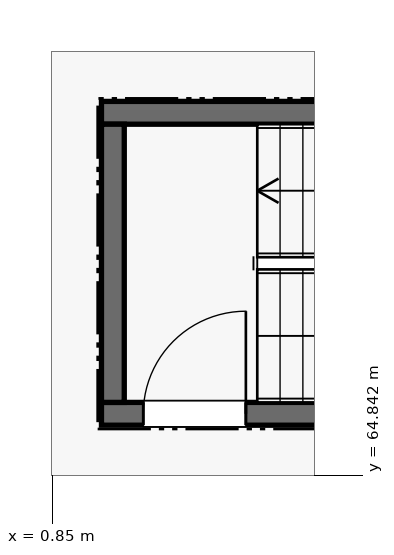
"""IFC4 building model, lengths in metres.
Left out: names, types, materials, properties, quantities, classifications, styles, units other than length and angle.
Written with IfcOpenShell. Run it as: python <this file> out.ifc"""

import sys

from ifc_helpers import new_model, si_unit, direction, frame, frame_2d, origin, place, context, subcontext, project, spatial, rectangle, extrude, element, fill, save


model = new_model("IFC4")
c1 = context("Model", 3, precision=1e-05, world=origin(), true_north=direction((0.0, 1.0)))
c2 = subcontext(c1, "Body", "Model", "MODEL_VIEW")
j1 = project(units=[si_unit("LENGTHUNIT", "METRE"), si_unit("PLANEANGLEUNIT", "RADIAN")], contexts=[c1])
p1 = place(None, origin())
s1 = spatial("IfcSite", under=j1, at=p1, CompositionType="ELEMENT")
p2 = place(p1, origin())
s2 = spatial("IfcBuilding", under=s1, at=p2, CompositionType="ELEMENT")
p3 = place(p2, frame((0.0, 0.0, 9.9)))
s3 = spatial("IfcBuildingStorey", under=s2, at=p3, CompositionType="ELEMENT", Elevation=9.9)
p4 = place(p3, frame((1.5, 65.65, 0.0), z_axis=(0.0, 0.0, 1.0), x_axis=(1.0, 0.0, 0.0)))
e1 = element("IfcWall", 1, at=p4, inside=s3, PredefinedType="SHEAR", context=c2, shape_type="SweptSolid", body=[
    extrude(rectangle(XDim=8.65, YDim=0.3, at=frame_2d((4.325, 0.0))), origin(), (0.0, 0.0, 1.0), 3.98),
])
p5 = place(p4, frame((0.55, 0.0, 0.0)))
e2 = element("IfcOpeningElement", 2, at=p5, cuts=e1, PredefinedType="OPENING", context=c2, shape_type="SweptSolid", body=[
    extrude(rectangle(XDim=1.35, YDim=2.2, at=frame_2d((0.675, 1.1))), frame((0.0, 0.16, 0.0), z_axis=(0.0, -1.0, 0.0), x_axis=(1.0, 0.0, 0.0)), (0.0, 0.0, 1.0), 0.32),
])
p6 = place(p3, frame((10.15, 69.61, 0.0), z_axis=(0.0, 0.0, 1.0), x_axis=(-1.0, 0.0, 0.0)))
e3 = element("IfcWall", 3, at=p6, inside=s3, PredefinedType="SHEAR", context=c2, shape_type="SweptSolid", body=[
    extrude(rectangle(XDim=8.65, YDim=0.3, at=frame_2d((4.325, 0.0))), origin(), (0.0, 0.0, 1.0), 3.98),
])
p7 = place(p3, frame((1.65, 69.46, 0.0), z_axis=(0.0, 0.0, 1.0), x_axis=(0.0, -1.0, 0.0)))
e4 = element("IfcWall", 4, at=p7, inside=s3, PredefinedType="SHEAR", context=c2, shape_type="SweptSolid", body=[
    extrude(rectangle(XDim=3.66, YDim=0.3, at=frame_2d((1.83, 0.0))), origin(), (0.0, 0.0, 1.0), 3.98),
])
p8 = place(p5, origin())
e5 = element("IfcDoor", 5, at=p8, inside=s3, OperationType="SINGLE_SWING_RIGHT", PredefinedType="DOOR", context=c2, shape_type="SweptSolid", body=[
    extrude(rectangle(XDim=1.35, YDim=2.2, at=frame_2d((0.675, 1.1))), frame((0.0, 0.025, 0.0), z_axis=(0.0, -1.0, 0.0), x_axis=(1.0, 0.0, 0.0)), (0.0, 0.0, 1.0), 0.05),
])
fill(e2, e5)
save(model, sys.argv[1])
